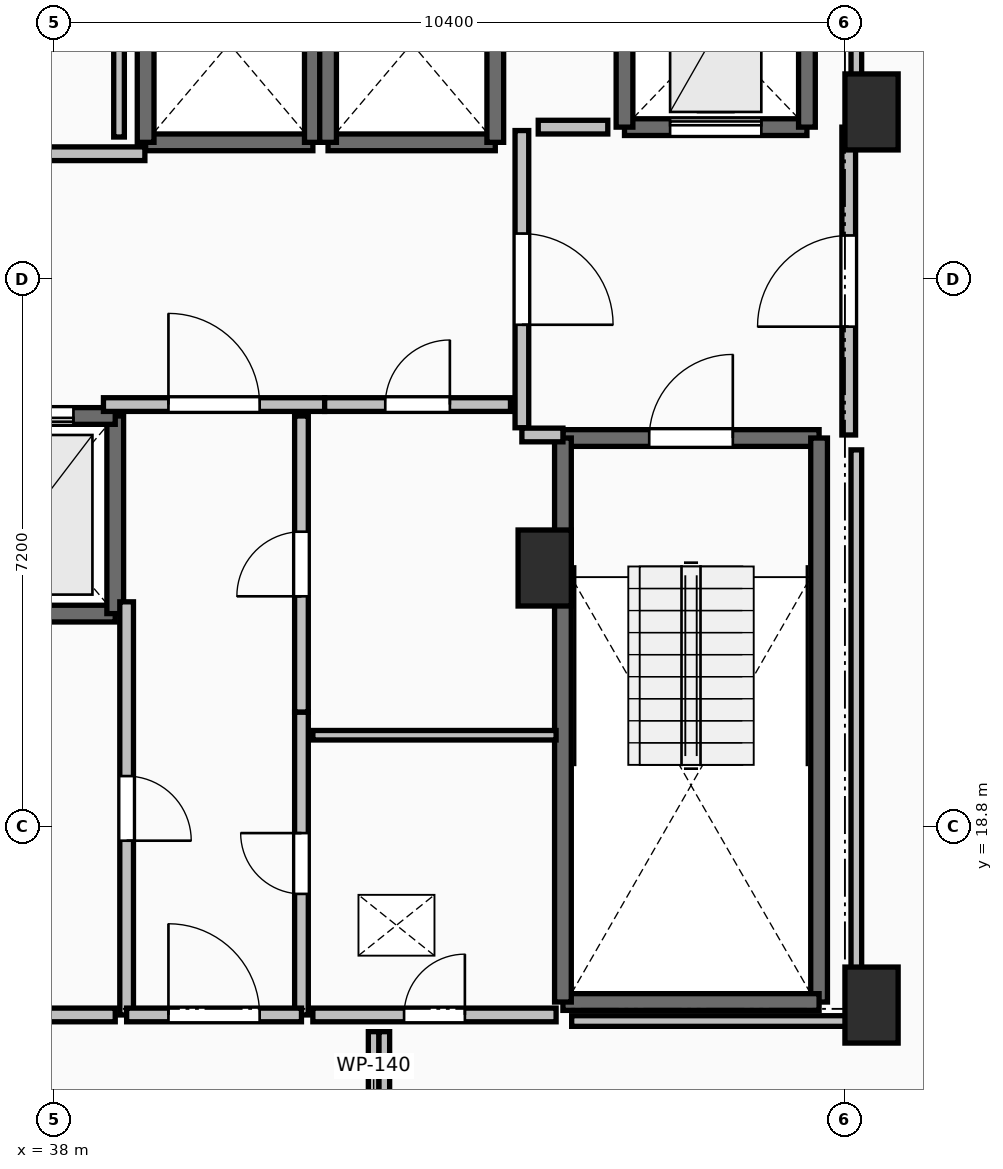
"""IFC4 building model, lengths in metres.
Left out: names, types, materials, properties, quantities, classifications, styles, units other than length and angle.
Written with IfcOpenShell. Run it as: python <this file> out.ifc"""

import sys

from ifc_helpers import new_model, si_unit, direction, frame, frame_2d, origin, origin_2d, place, context, subcontext, project, spatial, rectangle, extrude, element, fill, save


model = new_model("IFC4")
c1 = context("Model", 3, precision=1e-05, world=origin(), true_north=direction((0.0, 1.0)))
c2 = subcontext(c1, "Body", "Model", "MODEL_VIEW")
j1 = project(units=[si_unit("LENGTHUNIT", "METRE"), si_unit("PLANEANGLEUNIT", "RADIAN")], contexts=[c1])
p1 = place(None, origin())
s1 = spatial("IfcSite", under=j1, at=p1, CompositionType="ELEMENT")
p2 = place(p1, origin())
s2 = spatial("IfcBuilding", under=s1, at=p2, CompositionType="ELEMENT")
p3 = place(p2, frame((0.0, 0.0, 182.6)))
s3 = spatial("IfcBuildingStorey", under=s2, at=p3, CompositionType="ELEMENT", Elevation=182.6)
for number, where, z_axis, x_axis in (
    (1, (48.75, 28.2, 0.0), (0.0, 0.0, 1.0), (1.0, 0.0, 0.0)),
    (2, (48.75, 16.45, 0.0), (0.0, 0.0, 1.0), (1.0, 0.0, 0.0)),
    (3, (44.45, 22.2, 0.0), (0.0, 0.0, 1.0), (1.0, 0.0, 0.0)),
):
    element("IfcColumn", number, at=place(p3, frame(where, z_axis=z_axis, x_axis=x_axis)), inside=s3, PredefinedType="PILASTER", context=c2, shape_type="SweptSolid", body=[
        extrude(rectangle(XDim=0.7, YDim=1.0, at=origin_2d()), origin(), (0.0, 0.0, 1.0), 3.5),
    ])
p4 = place(p3, frame((44.69, 23.91, 0.0), z_axis=(0.0, 0.0, 1.0), x_axis=(1.0, 0.0, 0.0)))
e4 = element("IfcWall", 4, at=p4, inside=s3, PredefinedType="SOLIDWALL", context=c2, shape_type="SweptSolid", body=[
    extrude(rectangle(XDim=3.37, YDim=0.22, at=frame_2d((1.685, 0.0))), origin(), (0.0, 0.0, 1.0), 3.24),
])
p5 = place(p4, frame((1.135, 0.0, 0.0)))
e5 = element("IfcOpeningElement", 5, at=p5, cuts=e4, PredefinedType="OPENING", context=c2, shape_type="SweptSolid", body=[
    extrude(rectangle(XDim=1.1, YDim=2.15, at=frame_2d((0.55, 1.075))), frame((0.0, 0.125, 0.0), z_axis=(0.0, -1.0, 0.0), x_axis=(1.0, 0.0, 0.0)), (0.0, 0.0, 1.0), 0.25),
])
p6 = place(p3, frame((48.06, 23.91, 0.0), z_axis=(0.0, 0.0, 1.0), x_axis=(0.0, -1.0, 0.0)))
e6 = element("IfcWall", 6, at=p6, inside=s3, PredefinedType="SOLIDWALL", context=c2, shape_type="SweptSolid", body=[
    extrude(rectangle(XDim=7.42, YDim=0.22, at=frame_2d((3.71, 0.0))), origin(), (0.0, 0.0, 1.0), 3.24),
])
p7 = place(p3, frame((48.06, 16.49, 0.0), z_axis=(0.0, 0.0, 1.0), x_axis=(-1.0, 0.0, 0.0)))
e7 = element("IfcWall", 7, at=p7, inside=s3, PredefinedType="SOLIDWALL", context=c2, shape_type="SweptSolid", body=[
    extrude(rectangle(XDim=3.37, YDim=0.22, at=frame_2d((1.685, 0.0))), origin(), (0.0, 0.0, 1.0), 3.24),
])
p8 = place(p3, frame((44.69, 16.49, 0.0), z_axis=(0.0, 0.0, 1.0), x_axis=(0.0, 1.0, 0.0)))
e8 = element("IfcWall", 8, at=p8, inside=s3, PredefinedType="SOLIDWALL", context=c2, shape_type="SweptSolid", body=[
    extrude(rectangle(XDim=7.42, YDim=0.22, at=frame_2d((3.71, 0.0))), origin(), (0.0, 0.0, 1.0), 3.24),
])
p9 = place(p3, frame((36.6, 21.6, 0.0), z_axis=(0.0, 0.0, 1.0), x_axis=(1.0, 0.0, 0.0)))
e9 = element("IfcWall", 9, at=p9, inside=s3, PredefinedType="SOLIDWALL", context=c2, shape_type="SweptSolid", body=[
    extrude(rectangle(XDim=2.2, YDim=0.22, at=frame_2d((1.1, 0.0))), origin(), (0.0, 0.0, 1.0), 3.24),
])
p10 = place(p3, frame((38.8, 21.6, 0.0), z_axis=(0.0, 0.0, 1.0), x_axis=(0.0, 1.0, 0.0)))
e10 = element("IfcWall", 10, at=p10, inside=s3, PredefinedType="SOLIDWALL", context=c2, shape_type="SweptSolid", body=[
    extrude(rectangle(XDim=2.6, YDim=0.22, at=frame_2d((1.3, 0.0))), origin(), (0.0, 0.0, 1.0), 3.24),
])
p11 = place(p3, frame((38.8, 24.2, 0.0), z_axis=(0.0, 0.0, 1.0), x_axis=(-1.0, 0.0, 0.0)))
e11 = element("IfcWall", 11, at=p11, inside=s3, PredefinedType="SOLIDWALL", context=c2, shape_type="SweptSolid", body=[
    extrude(rectangle(XDim=2.2, YDim=0.22, at=frame_2d((1.1, 0.0))), origin(), (0.0, 0.0, 1.0), 3.24),
])
p12 = place(p11, frame((0.55, 0.0, 0.0)))
e12 = element("IfcOpeningElement", 12, at=p12, cuts=e11, PredefinedType="OPENING", context=c2, shape_type="SweptSolid", body=[
    extrude(rectangle(XDim=1.1, YDim=2.2, at=frame_2d((0.55, 1.1))), frame((0.0, 0.125, 0.0), z_axis=(0.0, -1.0, 0.0), x_axis=(1.0, 0.0, 0.0)), (0.0, 0.0, 1.0), 0.25),
])
p13 = place(p3, frame((39.2, 27.8, 0.0), z_axis=(0.0, 0.0, 1.0), x_axis=(1.0, 0.0, 0.0)))
e13 = element("IfcWall", 13, at=p13, inside=s3, PredefinedType="SOLIDWALL", context=c2, shape_type="SweptSolid", body=[
    extrude(rectangle(XDim=2.2, YDim=0.22, at=frame_2d((1.1, 0.0))), origin(), (0.0, 0.0, 1.0), 3.24),
])
for number, where, z_axis, x_axis in (
    (14, (41.4, 27.8, 0.0), (0.0, 0.0, 1.0), (0.0, 1.0, 0.0)),
    (15, (39.2, 30.4, 0.0), (0.0, 0.0, 1.0), (0.0, -1.0, 0.0)),
):
    element("IfcWall", number, at=place(p3, frame(where, z_axis=z_axis, x_axis=x_axis)), inside=s3, PredefinedType="SOLIDWALL", context=c2, shape_type="SweptSolid", body=[
        extrude(rectangle(XDim=2.6, YDim=0.22, at=frame_2d((1.3, 0.0))), origin(), (0.0, 0.0, 1.0), 3.24),
    ])
p14 = place(p3, frame((41.6, 27.8, 0.0), z_axis=(0.0, 0.0, 1.0), x_axis=(1.0, 0.0, 0.0)))
e16 = element("IfcWall", 16, at=p14, inside=s3, PredefinedType="SOLIDWALL", context=c2, shape_type="SweptSolid", body=[
    extrude(rectangle(XDim=2.2, YDim=0.22, at=frame_2d((1.1, 0.0))), origin(), (0.0, 0.0, 1.0), 3.24),
])
for number, where, z_axis, x_axis in (
    (17, (43.8, 27.8, 0.0), (0.0, 0.0, 1.0), (0.0, 1.0, 0.0)),
    (18, (41.6, 30.4, 0.0), (0.0, 0.0, 1.0), (0.0, -1.0, 0.0)),
):
    element("IfcWall", number, at=place(p3, frame(where, z_axis=z_axis, x_axis=x_axis)), inside=s3, PredefinedType="SOLIDWALL", context=c2, shape_type="SweptSolid", body=[
        extrude(rectangle(XDim=2.6, YDim=0.22, at=frame_2d((1.3, 0.0))), origin(), (0.0, 0.0, 1.0), 3.24),
    ])
p15 = place(p3, frame((45.5, 28.0, 0.0), z_axis=(0.0, 0.0, 1.0), x_axis=(1.0, 0.0, 0.0)))
e19 = element("IfcWall", 19, at=p15, inside=s3, PredefinedType="SHEAR", context=c2, shape_type="SweptSolid", body=[
    extrude(rectangle(XDim=2.4, YDim=0.22, at=frame_2d((1.2, 0.0))), origin(), (0.0, 0.0, 1.0), 3.24),
])
p16 = place(p15, frame((0.6, 0.0, 0.0)))
e20 = element("IfcOpeningElement", 20, at=p16, cuts=e19, PredefinedType="OPENING", context=c2, shape_type="SweptSolid", body=[
    extrude(rectangle(XDim=1.2, YDim=2.2, at=frame_2d((0.6, 1.1))), frame((0.0, 0.125, 0.0), z_axis=(0.0, -1.0, 0.0), x_axis=(1.0, 0.0, 0.0)), (0.0, 0.0, 1.0), 0.25),
])
for number, where, z_axis, x_axis in (
    (21, (47.9, 28.0, 0.0), (0.0, 0.0, 1.0), (0.0, 1.0, 0.0)),
    (22, (45.5, 30.5, 0.0), (0.0, 0.0, 1.0), (0.0, -1.0, 0.0)),
):
    element("IfcWall", number, at=place(p3, frame(where, z_axis=z_axis, x_axis=x_axis)), inside=s3, PredefinedType="SHEAR", context=c2, shape_type="SweptSolid", body=[
        extrude(rectangle(XDim=2.5, YDim=0.22, at=frame_2d((1.25, 0.0))), origin(), (0.0, 0.0, 1.0), 3.24),
    ])
p17 = place(p3, frame((44.15, 27.955, 0.0), z_axis=(0.0, 0.0, 1.0), x_axis=(0.0, -1.0, 0.0)))
e23 = element("IfcWall", 23, at=p17, inside=s3, PredefinedType="PARTITIONING", context=c2, shape_type="SweptSolid", body=[
    extrude(rectangle(XDim=3.91, YDim=0.18, at=frame_2d((1.955, 0.0))), origin(), (0.0, 0.0, 1.0), 3.24),
])
p18 = place(p17, frame((1.355, 0.0, 0.0)))
e24 = element("IfcOpeningElement", 24, at=p18, cuts=e23, PredefinedType="OPENING", context=c2, shape_type="SweptSolid", body=[
    extrude(rectangle(XDim=1.2, YDim=2.15, at=frame_2d((0.6, 1.075))), frame((0.0, 0.105, 0.0), z_axis=(0.0, -1.0, 0.0), x_axis=(1.0, 0.0, 0.0)), (0.0, 0.0, 1.0), 0.21),
])
p19 = place(p3, frame((44.15, 23.95, 0.0), z_axis=(0.0, 0.0, 1.0), x_axis=(1.0, 0.0, 0.0)))
e25 = element("IfcWall", 25, at=p19, inside=s3, PredefinedType="PARTITIONING", context=c2, shape_type="SweptSolid", body=[
    extrude(rectangle(XDim=0.54, YDim=0.18, at=frame_2d((0.27, 0.0))), origin(), (0.0, 0.0, 1.0), 3.24),
])
p20 = place(p3, frame((48.45, 23.95, 0.0), z_axis=(0.0, 0.0, 1.0), x_axis=(0.0, 1.0, 0.0)))
e26 = element("IfcWall", 26, at=p20, inside=s3, PredefinedType="PARTITIONING", context=c2, shape_type="SweptSolid", body=[
    extrude(rectangle(XDim=4.05, YDim=0.18, at=frame_2d((2.025, 0.0))), origin(), (0.0, 0.0, 1.0), 3.24),
])
p21 = place(p20, frame((1.425, 0.0, 0.0)))
e27 = element("IfcOpeningElement", 27, at=p21, cuts=e26, PredefinedType="OPENING", context=c2, shape_type="SweptSolid", body=[
    extrude(rectangle(XDim=1.2, YDim=2.15, at=frame_2d((0.6, 1.075))), frame((0.0, 0.105, 0.0), z_axis=(0.0, -1.0, 0.0), x_axis=(1.0, 0.0, 0.0)), (0.0, 0.0, 1.0), 0.21),
])
p22 = place(p3, frame((38.645, 24.35, 0.0), z_axis=(0.0, 0.0, 1.0), x_axis=(1.0, 0.0, 0.0)))
e28 = element("IfcWall", 28, at=p22, inside=s3, PredefinedType="PARTITIONING", context=c2, shape_type="SweptSolid", body=[
    extrude(rectangle(XDim=2.91, YDim=0.18, at=frame_2d((1.455, 0.0))), origin(), (0.0, 0.0, 1.0), 3.24),
])
p23 = place(p22, frame((0.855, 0.0, 0.0)))
e29 = element("IfcOpeningElement", 29, at=p23, cuts=e28, PredefinedType="OPENING", context=c2, shape_type="SweptSolid", body=[
    extrude(rectangle(XDim=1.2, YDim=2.15, at=frame_2d((0.6, 1.075))), frame((0.0, 0.105, 0.0), z_axis=(0.0, -1.0, 0.0), x_axis=(1.0, 0.0, 0.0)), (0.0, 0.0, 1.0), 0.21),
])
p24 = place(p3, frame((41.555, 24.35, 0.0), z_axis=(0.0, 0.0, 1.0), x_axis=(1.0, 0.0, 0.0)))
e30 = element("IfcWall", 30, at=p24, inside=s3, PredefinedType="PARTITIONING", context=c2, shape_type="SweptSolid", body=[
    extrude(rectangle(XDim=2.445, YDim=0.18, at=frame_2d((1.223, 0.0))), origin(), (0.0, 0.0, 1.0), 3.24),
])
p25 = place(p24, frame((0.798, 0.0, 0.0)))
e31 = element("IfcOpeningElement", 31, at=p25, cuts=e30, PredefinedType="OPENING", context=c2, shape_type="SweptSolid", body=[
    extrude(rectangle(XDim=0.85, YDim=2.1, at=frame_2d((0.425, 1.05))), frame((0.0, 0.105, 0.0), z_axis=(0.0, -1.0, 0.0), x_axis=(1.0, 0.0, 0.0)), (0.0, 0.0, 1.0), 0.21),
])
p26 = place(p3, frame((39.19, 27.65, 0.0), z_axis=(0.0, 0.0, 1.0), x_axis=(-1.0, 0.0, 0.0)))
e32 = element("IfcWall", 32, at=p26, inside=s3, PredefinedType="PARTITIONING", context=c2, shape_type="SweptSolid", body=[
    extrude(rectangle(XDim=7.19, YDim=0.18, at=frame_2d((3.595, 0.0))), origin(), (0.0, 0.0, 1.0), 3.24),
])
p27 = place(p26, frame((3.095, 0.0, 0.0)))
e33 = element("IfcOpeningElement", 33, at=p27, cuts=e32, PredefinedType="OPENING", context=c2, shape_type="SweptSolid", body=[
    extrude(rectangle(XDim=1.0, YDim=2.15, at=frame_2d((0.5, 1.075))), frame((0.0, 0.105, 0.0), z_axis=(0.0, -1.0, 0.0), x_axis=(1.0, 0.0, 0.0)), (0.0, 0.0, 1.0), 0.21),
])
p28 = place(p3, frame((41.25, 16.32, 0.0), z_axis=(0.0, 0.0, 1.0), x_axis=(0.0, 1.0, 0.0)))
e34 = element("IfcWall", 34, at=p28, inside=s3, PredefinedType="PARTITIONING", context=c2, shape_type="SweptSolid", body=[
    extrude(rectangle(XDim=3.985, YDim=0.18, at=frame_2d((1.992, 0.0))), origin(), (0.0, 0.0, 1.0), 3.24),
])
p29 = place(p28, frame((1.593, 0.0, 0.0)))
e35 = element("IfcOpeningElement", 35, at=p29, cuts=e34, PredefinedType="OPENING", context=c2, shape_type="SweptSolid", body=[
    extrude(rectangle(XDim=0.8, YDim=2.05, at=frame_2d((0.4, 1.025))), frame((0.0, 0.105, 0.0), z_axis=(0.0, -1.0, 0.0), x_axis=(1.0, 0.0, 0.0)), (0.0, 0.0, 1.0), 0.21),
])
p30 = place(p3, frame((41.25, 20.305, 0.0), z_axis=(0.0, 0.0, 1.0), x_axis=(0.0, 1.0, 0.0)))
e36 = element("IfcWall", 36, at=p30, inside=s3, PredefinedType="PARTITIONING", context=c2, shape_type="SweptSolid", body=[
    extrude(rectangle(XDim=3.895, YDim=0.18, at=frame_2d((1.948, 0.0))), origin(), (0.0, 0.0, 1.0), 3.24),
])
p31 = place(p30, frame((1.522, 0.0, 0.0)))
e37 = element("IfcOpeningElement", 37, at=p31, cuts=e36, PredefinedType="OPENING", context=c2, shape_type="SweptSolid", body=[
    extrude(rectangle(XDim=0.85, YDim=2.1, at=frame_2d((0.425, 1.05))), frame((0.0, 0.105, 0.0), z_axis=(0.0, -1.0, 0.0), x_axis=(1.0, 0.0, 0.0)), (0.0, 0.0, 1.0), 0.21),
])
p32 = place(p3, frame((38.95, 21.755, 0.0), z_axis=(0.0, 0.0, 1.0), x_axis=(0.0, -1.0, 0.0)))
e38 = element("IfcWall", 38, at=p32, inside=s3, PredefinedType="PARTITIONING", context=c2, shape_type="SweptSolid", body=[
    extrude(rectangle(XDim=5.435, YDim=0.18, at=frame_2d((2.717, 0.0))), origin(), (0.0, 0.0, 1.0), 3.24),
])
p33 = place(p32, frame((2.292, 0.0, 0.0)))
e39 = element("IfcOpeningElement", 39, at=p33, cuts=e38, PredefinedType="OPENING", context=c2, shape_type="SweptSolid", body=[
    extrude(rectangle(XDim=0.85, YDim=2.1, at=frame_2d((0.425, 1.05))), frame((0.0, 0.105, 0.0), z_axis=(0.0, -1.0, 0.0), x_axis=(1.0, 0.0, 0.0)), (0.0, 0.0, 1.0), 0.21),
])
p34 = place(p3, frame((38.95, 16.32, 0.0), z_axis=(0.0, 0.0, 1.0), x_axis=(1.0, 0.0, 0.0)))
e40 = element("IfcWall", 40, at=p34, inside=s3, PredefinedType="PARTITIONING", context=c2, shape_type="SweptSolid", body=[
    extrude(rectangle(XDim=2.3, YDim=0.18, at=frame_2d((1.15, 0.0))), origin(), (0.0, 0.0, 1.0), 3.24),
])
p35 = place(p34, frame((0.55, 0.0, 0.0)))
e41 = element("IfcOpeningElement", 41, at=p35, cuts=e40, PredefinedType="OPENING", context=c2, shape_type="SweptSolid", body=[
    extrude(rectangle(XDim=1.2, YDim=2.15, at=frame_2d((0.6, 1.075))), frame((0.0, 0.105, 0.0), z_axis=(0.0, -1.0, 0.0), x_axis=(1.0, 0.0, 0.0)), (0.0, 0.0, 1.0), 0.21),
])
p36 = place(p3, frame((44.6, 20.0, 0.0), z_axis=(0.0, 0.0, 1.0), x_axis=(-1.0, 0.0, 0.0)))
e42 = element("IfcWall", 42, at=p36, inside=s3, PredefinedType="PARTITIONING", context=c2, shape_type="SweptSolid", body=[
    extrude(rectangle(XDim=3.2, YDim=0.125, at=frame_2d((1.6, 0.0))), origin(), (0.0, 0.0, 1.0), 3.24),
])
p37 = place(p3, frame((41.4, 16.32, 0.0), z_axis=(0.0, 0.0, 1.0), x_axis=(1.0, 0.0, 0.0)))
e43 = element("IfcWall", 43, at=p37, inside=s3, PredefinedType="PARTITIONING", context=c2, shape_type="SweptSolid", body=[
    extrude(rectangle(XDim=3.2, YDim=0.18, at=frame_2d((1.6, 0.0))), origin(), (0.0, 0.0, 1.0), 3.24),
])
p38 = place(p37, frame((1.2, 0.0, 0.0)))
e44 = element("IfcOpeningElement", 44, at=p38, cuts=e43, PredefinedType="OPENING", context=c2, shape_type="SweptSolid", body=[
    extrude(rectangle(XDim=0.8, YDim=2.05, at=frame_2d((0.4, 1.025))), frame((0.0, 0.105, 0.0), z_axis=(0.0, -1.0, 0.0), x_axis=(1.0, 0.0, 0.0)), (0.0, 0.0, 1.0), 0.21),
])
p39 = place(p3, frame((31.4, 16.32, 0.0), z_axis=(0.0, 0.0, 1.0), x_axis=(1.0, 0.0, 0.0)))
e45 = element("IfcWall", 45, at=p39, inside=s3, PredefinedType="PARTITIONING", context=c2, shape_type="SweptSolid", body=[
    extrude(rectangle(XDim=7.4, YDim=0.18, at=frame_2d((3.7, 0.0))), origin(), (0.0, 0.0, 1.0), 3.24),
])
p40 = place(p39, frame((3.275, 0.0, 0.0)))
e46 = element("IfcOpeningElement", 46, at=p40, cuts=e45, PredefinedType="OPENING", context=c2, shape_type="SweptSolid", body=[
    extrude(rectangle(XDim=0.85, YDim=2.1, at=frame_2d((0.425, 1.05))), frame((0.0, 0.105, 0.0), z_axis=(0.0, -1.0, 0.0), x_axis=(1.0, 0.0, 0.0)), (0.0, 0.0, 1.0), 0.21),
])
p41 = place(p3, frame((45.28, 28.0, 0.0), z_axis=(0.0, 0.0, 1.0), x_axis=(-1.0, 0.0, 0.0)))
e47 = element("IfcWall", 47, at=p41, inside=s3, PredefinedType="PARTITIONING", context=c2, shape_type="SweptSolid", body=[
    extrude(rectangle(XDim=0.915, YDim=0.18, at=frame_2d((0.458, 0.0))), origin(), (0.0, 0.0, 1.0), 3.24),
])
p42 = place(p3, frame((38.85, 27.87, 0.0), z_axis=(0.0, 0.0, 1.0), x_axis=(0.0, 1.0, 0.0)))
e48 = element("IfcWall", 48, at=p42, inside=s3, PredefinedType="PARTITIONING", context=c2, shape_type="SweptSolid", body=[
    extrude(rectangle(XDim=2.39, YDim=0.14, at=frame_2d((1.195, 0.0))), origin(), (0.0, 0.0, 1.0), 3.24),
])
p43 = place(p3, frame((44.805, 16.24, 0.0), z_axis=(0.0, 0.0, 1.0), x_axis=(1.0, 0.0, 0.0)))
e49 = element("IfcWall", 49, at=p43, inside=s3, PredefinedType="PARTITIONING", context=c2, shape_type="SweptSolid", body=[
    extrude(rectangle(XDim=3.745, YDim=0.14, at=frame_2d((1.873, 0.0))), origin(), (0.0, 0.0, 1.0), 2.432),
])
p44 = place(p3, frame((48.55, 16.24, 0.0), z_axis=(0.0, 0.0, 1.0), x_axis=(0.0, 1.0, 0.0)))
e50 = element("IfcWall", 50, at=p44, inside=s3, PredefinedType="PARTITIONING", context=c2, shape_type="SweptSolid", body=[
    extrude(rectangle(XDim=7.514, YDim=0.14, at=frame_2d((3.757, 0.0))), origin(), (0.0, 0.0, 1.0), 2.432),
])
p45 = place(p3, frame((48.55, 28.196, 0.0), z_axis=(0.0, 0.0, 1.0), x_axis=(0.0, 1.0, 0.0)))
e51 = element("IfcWall", 51, at=p45, inside=s3, PredefinedType="PARTITIONING", context=c2, shape_type="SweptSolid", body=[
    extrude(rectangle(XDim=5.254, YDim=0.14, at=frame_2d((2.627, 0.0))), origin(), (0.0, 0.0, 1.0), 2.432),
])
for number, where, z_axis, x_axis in (
    (52, (42.2, 16.1, 0.0), (0.0, 0.0, 1.0), (0.0, -1.0, 0.0)),
    (53, (42.34, 14.27, 0.0), (0.0, 0.0, 1.0), (0.0, 1.0, 0.0)),
):
    element("IfcWall", number, at=place(p3, frame(where, z_axis=z_axis, x_axis=x_axis)), inside=s3, PredefinedType="PARTITIONING", context=c2, shape_type="SweptSolid", body=[
        extrude(rectangle(XDim=1.83, YDim=0.14, at=frame_2d((0.915, 0.0))), origin(), (0.0, 0.0, 1.0), 2.922),
    ])
p46 = place(p5, origin())
e54 = element("IfcDoor", 54, at=p46, inside=s3, OperationType="SINGLE_SWING_RIGHT", PredefinedType="DOOR", context=c2, shape_type="SweptSolid", body=[
    extrude(rectangle(XDim=1.1, YDim=2.15, at=frame_2d((0.55, 1.075))), frame((0.0, 0.025, 0.0), z_axis=(0.0, -1.0, 0.0), x_axis=(1.0, 0.0, 0.0)), (0.0, 0.0, 1.0), 0.05),
])
fill(e5, e54)
p47 = place(p12, origin())
e55 = element("IfcDoor", 55, at=p47, inside=s3, OperationType="SLIDING_TO_LEFT", PredefinedType="DOOR", context=c2, shape_type="SweptSolid", body=[
    extrude(rectangle(XDim=1.1, YDim=2.2, at=frame_2d((0.55, 1.1))), frame((0.0, 0.025, 0.0), z_axis=(0.0, -1.0, 0.0), x_axis=(1.0, 0.0, 0.0)), (0.0, 0.0, 1.0), 0.05),
])
fill(e12, e55)
p48 = place(p16, origin())
e56 = element("IfcDoor", 56, at=p48, inside=s3, OperationType="SLIDING_TO_LEFT", PredefinedType="DOOR", context=c2, shape_type="SweptSolid", body=[
    extrude(rectangle(XDim=1.2, YDim=2.2, at=frame_2d((0.6, 1.1))), frame((0.0, 0.025, 0.0), z_axis=(0.0, -1.0, 0.0), x_axis=(1.0, 0.0, 0.0)), (0.0, 0.0, 1.0), 0.05),
])
fill(e20, e56)
p49 = place(p18, origin())
e57 = element("IfcDoor", 57, at=p49, inside=s3, OperationType="SINGLE_SWING_RIGHT", PredefinedType="DOOR", context=c2, shape_type="SweptSolid", body=[
    extrude(rectangle(XDim=1.2, YDim=2.15, at=frame_2d((0.6, 1.075))), frame((0.0, 0.025, 0.0), z_axis=(0.0, -1.0, 0.0), x_axis=(1.0, 0.0, 0.0)), (0.0, 0.0, 1.0), 0.05),
])
fill(e24, e57)
p50 = place(p21, origin())
e58 = element("IfcDoor", 58, at=p50, inside=s3, OperationType="SINGLE_SWING_LEFT", PredefinedType="DOOR", context=c2, shape_type="SweptSolid", body=[
    extrude(rectangle(XDim=1.2, YDim=2.15, at=frame_2d((0.6, 1.075))), frame((0.0, 0.025, 0.0), z_axis=(0.0, -1.0, 0.0), x_axis=(1.0, 0.0, 0.0)), (0.0, 0.0, 1.0), 0.05),
])
fill(e27, e58)
p51 = place(p23, origin())
e59 = element("IfcDoor", 59, at=p51, inside=s3, OperationType="SINGLE_SWING_LEFT", PredefinedType="DOOR", context=c2, shape_type="SweptSolid", body=[
    extrude(rectangle(XDim=1.2, YDim=2.15, at=frame_2d((0.6, 1.075))), frame((0.0, 0.025, 0.0), z_axis=(0.0, -1.0, 0.0), x_axis=(1.0, 0.0, 0.0)), (0.0, 0.0, 1.0), 0.05),
])
fill(e29, e59)
p52 = place(p25, origin())
e60 = element("IfcDoor", 60, at=p52, inside=s3, OperationType="SINGLE_SWING_RIGHT", PredefinedType="DOOR", context=c2, shape_type="SweptSolid", body=[
    extrude(rectangle(XDim=0.85, YDim=2.1, at=frame_2d((0.425, 1.05))), frame((0.0, 0.025, 0.0), z_axis=(0.0, -1.0, 0.0), x_axis=(1.0, 0.0, 0.0)), (0.0, 0.0, 1.0), 0.05),
])
fill(e31, e60)
p53 = place(p29, origin())
e61 = element("IfcDoor", 61, at=p53, inside=s3, OperationType="SINGLE_SWING_RIGHT", PredefinedType="DOOR", context=c2, shape_type="SweptSolid", body=[
    extrude(rectangle(XDim=0.8, YDim=2.05, at=frame_2d((0.4, 1.025))), frame((0.0, 0.025, 0.0), z_axis=(0.0, -1.0, 0.0), x_axis=(1.0, 0.0, 0.0)), (0.0, 0.0, 1.0), 0.05),
])
fill(e35, e61)
p54 = place(p31, origin())
e62 = element("IfcDoor", 62, at=p54, inside=s3, OperationType="SINGLE_SWING_LEFT", PredefinedType="DOOR", context=c2, shape_type="SweptSolid", body=[
    extrude(rectangle(XDim=0.85, YDim=2.1, at=frame_2d((0.425, 1.05))), frame((0.0, 0.025, 0.0), z_axis=(0.0, -1.0, 0.0), x_axis=(1.0, 0.0, 0.0)), (0.0, 0.0, 1.0), 0.05),
])
fill(e37, e62)
p55 = place(p33, origin())
e63 = element("IfcDoor", 63, at=p55, inside=s3, OperationType="SINGLE_SWING_RIGHT", PredefinedType="DOOR", context=c2, shape_type="SweptSolid", body=[
    extrude(rectangle(XDim=0.85, YDim=2.1, at=frame_2d((0.425, 1.05))), frame((0.0, 0.025, 0.0), z_axis=(0.0, -1.0, 0.0), x_axis=(1.0, 0.0, 0.0)), (0.0, 0.0, 1.0), 0.05),
])
fill(e39, e63)
p56 = place(p35, origin())
e64 = element("IfcDoor", 64, at=p56, inside=s3, OperationType="SINGLE_SWING_LEFT", PredefinedType="DOOR", context=c2, shape_type="SweptSolid", body=[
    extrude(rectangle(XDim=1.2, YDim=2.15, at=frame_2d((0.6, 1.075))), frame((0.0, 0.025, 0.0), z_axis=(0.0, -1.0, 0.0), x_axis=(1.0, 0.0, 0.0)), (0.0, 0.0, 1.0), 0.05),
])
fill(e41, e64)
p57 = place(p38, origin())
e65 = element("IfcDoor", 65, at=p57, inside=s3, OperationType="SINGLE_SWING_RIGHT", PredefinedType="DOOR", context=c2, shape_type="SweptSolid", body=[
    extrude(rectangle(XDim=0.8, YDim=2.05, at=frame_2d((0.4, 1.025))), frame((0.0, 0.025, 0.0), z_axis=(0.0, -1.0, 0.0), x_axis=(1.0, 0.0, 0.0)), (0.0, 0.0, 1.0), 0.05),
])
fill(e44, e65)
save(model, sys.argv[1])
